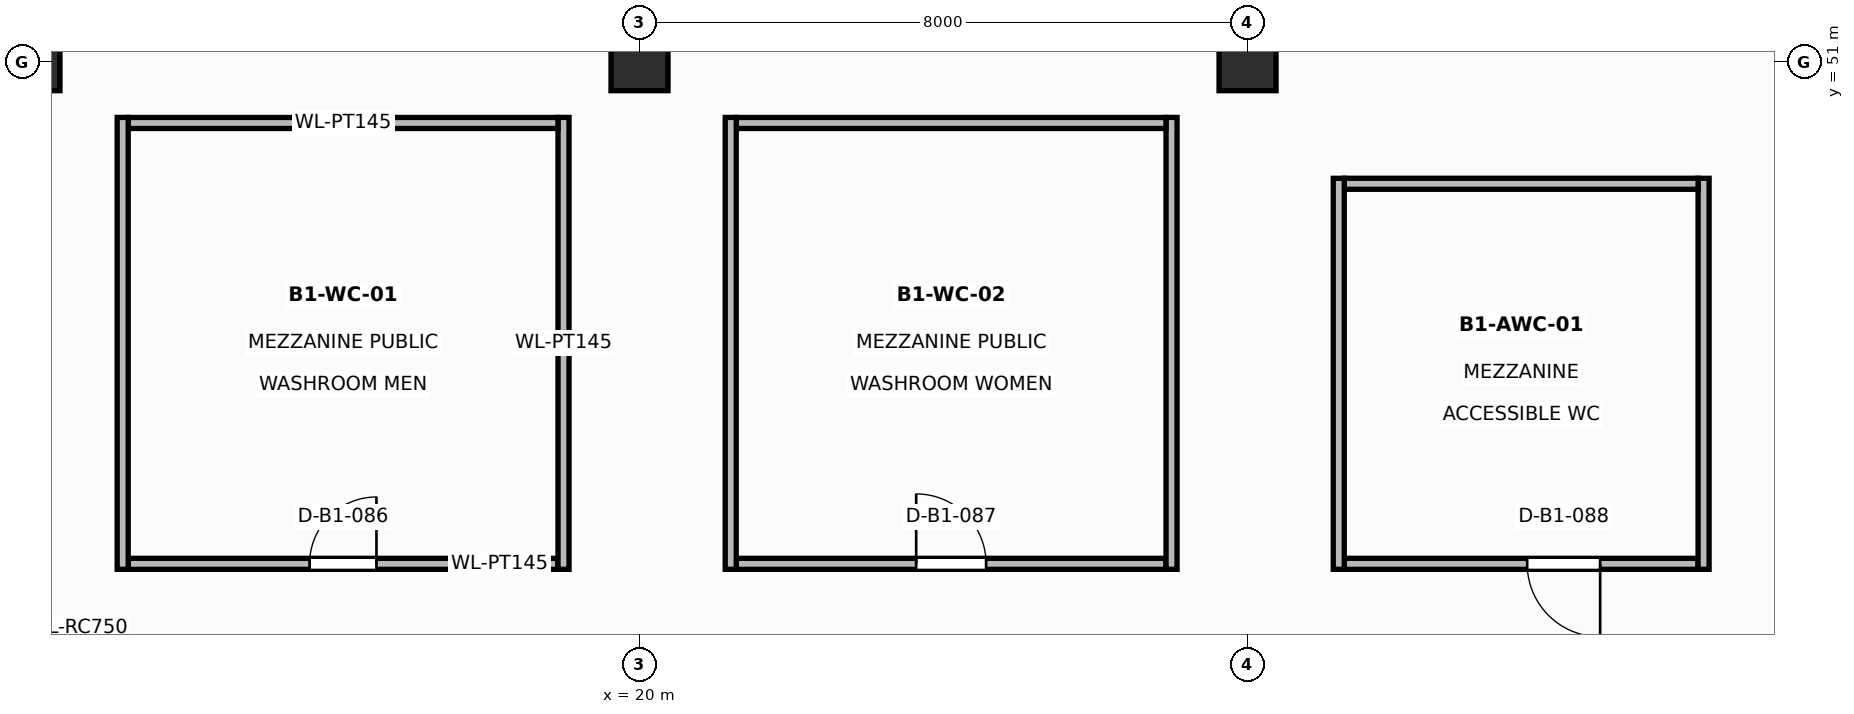
"""IFC4 building model, lengths in metres.
Left out: names, types, materials, properties, quantities, classifications, styles, units other than length and angle.
Written with IfcOpenShell. Run it as: python <this file> out.ifc"""

import sys

from ifc_helpers import new_model, si_unit, direction, frame, frame_2d, origin, origin_2d, place, context, subcontext, project, spatial, rectangle, extrude, element, fill, save


model = new_model("IFC4")
c1 = context("Model", 3, precision=1e-05, world=origin(), true_north=direction((0.0, 1.0)))
c2 = subcontext(c1, "Body", "Model", "MODEL_VIEW")
j1 = project(units=[si_unit("LENGTHUNIT", "METRE"), si_unit("PLANEANGLEUNIT", "RADIAN")], contexts=[c1])
p1 = place(None, origin())
s1 = spatial("IfcSite", under=j1, at=p1, CompositionType="ELEMENT")
p2 = place(p1, origin())
s2 = spatial("IfcBuilding", under=s1, at=p2, CompositionType="ELEMENT")
p3 = place(p2, frame((0.0, 0.0, -5.6)))
s3 = spatial("IfcBuildingStorey", under=s2, at=p3, CompositionType="ELEMENT", Elevation=-5.6)
for number, where, z_axis, x_axis in (
    (1, (12.0, 51.0, 0.0), (0.0, 0.0, 1.0), (1.0, 0.0, 0.0)),
    (2, (20.0, 51.0, 0.0), (0.0, 0.0, 1.0), (1.0, 0.0, 0.0)),
    (3, (28.0, 51.0, 0.0), (0.0, 0.0, 1.0), (1.0, 0.0, 0.0)),
):
    element("IfcColumn", number, at=place(p3, frame(where, z_axis=z_axis, x_axis=x_axis)), inside=s3, PredefinedType="COLUMN", context=c2, shape_type="SweptSolid", body=[
        extrude(rectangle(XDim=0.75, YDim=0.75, at=origin_2d()), origin(), (0.0, 0.0, 1.0), 5.6),
    ])
p4 = place(p3, frame((13.272, 44.4, 0.0), z_axis=(0.0, 0.0, 1.0), x_axis=(1.0, 0.0, 0.0)))
e4 = element("IfcWall", 4, at=p4, inside=s3, PredefinedType="PARTITIONING", context=c2, shape_type="SweptSolid", body=[
    extrude(rectangle(XDim=5.655, YDim=0.145, at=frame_2d((2.828, 0.0))), origin(), (0.0, 0.0, 1.0), 5.18),
])
p5 = place(p4, frame((2.387, 0.0, 0.0)))
e5 = element("IfcOpeningElement", 5, at=p5, cuts=e4, PredefinedType="OPENING", context=c2, shape_type="SweptSolid", body=[
    extrude(rectangle(XDim=0.88, YDim=2.08, at=frame_2d((0.44, 1.04))), frame((0.0, 0.083, 0.0), z_axis=(0.0, -1.0, 0.0), x_axis=(1.0, 0.0, 0.0)), (0.0, 0.0, 1.0), 0.165),
])
p6 = place(p3, frame((19.0, 44.328, 0.0), z_axis=(0.0, 0.0, 1.0), x_axis=(0.0, 1.0, 0.0)))
e6 = element("IfcWall", 6, at=p6, inside=s3, PredefinedType="PARTITIONING", context=c2, shape_type="SweptSolid", body=[
    extrude(rectangle(XDim=5.945, YDim=0.145, at=frame_2d((2.973, 0.0))), origin(), (0.0, 0.0, 1.0), 4.625),
])
p7 = place(p3, frame((18.927, 50.2, 0.0), z_axis=(0.0, 0.0, 1.0), x_axis=(-1.0, 0.0, 0.0)))
e7 = element("IfcWall", 7, at=p7, inside=s3, PredefinedType="PARTITIONING", context=c2, shape_type="SweptSolid", body=[
    extrude(rectangle(XDim=5.655, YDim=0.145, at=frame_2d((2.828, 0.0))), origin(), (0.0, 0.0, 1.0), 5.18),
])
p8 = place(p3, frame((13.2, 50.273, 0.0), z_axis=(0.0, 0.0, 1.0), x_axis=(0.0, -1.0, 0.0)))
e8 = element("IfcWall", 8, at=p8, inside=s3, PredefinedType="PARTITIONING", context=c2, shape_type="SweptSolid", body=[
    extrude(rectangle(XDim=5.945, YDim=0.145, at=frame_2d((2.973, 0.0))), origin(), (0.0, 0.0, 1.0), 4.625),
])
p9 = place(p3, frame((21.273, 44.4, 0.0), z_axis=(0.0, 0.0, 1.0), x_axis=(1.0, 0.0, 0.0)))
e9 = element("IfcWall", 9, at=p9, inside=s3, PredefinedType="PARTITIONING", context=c2, shape_type="SweptSolid", body=[
    extrude(rectangle(XDim=5.654, YDim=0.145, at=frame_2d((2.827, 0.0))), origin(), (0.0, 0.0, 1.0), 5.18),
])
p10 = place(p9, frame((2.367, 0.0, 0.0)))
e10 = element("IfcOpeningElement", 10, at=p10, cuts=e9, PredefinedType="OPENING", context=c2, shape_type="SweptSolid", body=[
    extrude(rectangle(XDim=0.92, YDim=2.1, at=frame_2d((0.46, 1.05))), frame((0.0, 0.083, 0.0), z_axis=(0.0, -1.0, 0.0), x_axis=(1.0, 0.0, 0.0)), (0.0, 0.0, 1.0), 0.165),
])
p11 = place(p3, frame((27.0, 44.328, 0.0), z_axis=(0.0, 0.0, 1.0), x_axis=(0.0, 1.0, 0.0)))
e11 = element("IfcWall", 11, at=p11, inside=s3, PredefinedType="PARTITIONING", context=c2, shape_type="SweptSolid", body=[
    extrude(rectangle(XDim=5.945, YDim=0.145, at=frame_2d((2.973, 0.0))), origin(), (0.0, 0.0, 1.0), 4.625),
])
p12 = place(p3, frame((26.927, 50.2, 0.0), z_axis=(0.0, 0.0, 1.0), x_axis=(-1.0, 0.0, 0.0)))
e12 = element("IfcWall", 12, at=p12, inside=s3, PredefinedType="PARTITIONING", context=c2, shape_type="SweptSolid", body=[
    extrude(rectangle(XDim=5.654, YDim=0.145, at=frame_2d((2.827, 0.0))), origin(), (0.0, 0.0, 1.0), 5.18),
])
p13 = place(p3, frame((21.2, 50.273, 0.0), z_axis=(0.0, 0.0, 1.0), x_axis=(0.0, -1.0, 0.0)))
e13 = element("IfcWall", 13, at=p13, inside=s3, PredefinedType="PARTITIONING", context=c2, shape_type="SweptSolid", body=[
    extrude(rectangle(XDim=5.945, YDim=0.145, at=frame_2d((2.973, 0.0))), origin(), (0.0, 0.0, 1.0), 4.625),
])
p14 = place(p3, frame((29.273, 44.4, 0.0), z_axis=(0.0, 0.0, 1.0), x_axis=(1.0, 0.0, 0.0)))
e14 = element("IfcWall", 14, at=p14, inside=s3, PredefinedType="PARTITIONING", context=c2, shape_type="SweptSolid", body=[
    extrude(rectangle(XDim=4.655, YDim=0.145, at=frame_2d((2.328, 0.0))), origin(), (0.0, 0.0, 1.0), 5.18),
])
p15 = place(p14, frame((2.406, 0.0, 0.0)))
e15 = element("IfcOpeningElement", 15, at=p15, cuts=e14, PredefinedType="OPENING", context=c2, shape_type="SweptSolid", body=[
    extrude(rectangle(XDim=0.96, YDim=2.12, at=frame_2d((0.48, 1.06))), frame((0.0, 0.083, 0.0), z_axis=(0.0, -1.0, 0.0), x_axis=(1.0, 0.0, 0.0)), (0.0, 0.0, 1.0), 0.165),
])
p16 = place(p3, frame((34.0, 44.328, 0.0), z_axis=(0.0, 0.0, 1.0), x_axis=(0.0, 1.0, 0.0)))
e16 = element("IfcWall", 16, at=p16, inside=s3, PredefinedType="PARTITIONING", context=c2, shape_type="SweptSolid", body=[
    extrude(rectangle(XDim=5.144, YDim=0.145, at=frame_2d((2.572, 0.0))), origin(), (0.0, 0.0, 1.0), 4.625),
])
p17 = place(p3, frame((33.928, 49.4, 0.0), z_axis=(0.0, 0.0, 1.0), x_axis=(-1.0, 0.0, 0.0)))
e17 = element("IfcWall", 17, at=p17, inside=s3, PredefinedType="PARTITIONING", context=c2, shape_type="SweptSolid", body=[
    extrude(rectangle(XDim=4.655, YDim=0.145, at=frame_2d((2.328, 0.0))), origin(), (0.0, 0.0, 1.0), 5.18),
])
p18 = place(p3, frame((29.2, 49.472, 0.0), z_axis=(0.0, 0.0, 1.0), x_axis=(0.0, -1.0, 0.0)))
e18 = element("IfcWall", 18, at=p18, inside=s3, PredefinedType="PARTITIONING", context=c2, shape_type="SweptSolid", body=[
    extrude(rectangle(XDim=5.144, YDim=0.145, at=frame_2d((2.572, 0.0))), origin(), (0.0, 0.0, 1.0), 4.625),
])
p19 = place(p5, origin())
e19 = element("IfcDoor", 19, at=p19, inside=s3, OperationType="SINGLE_SWING_RIGHT", PredefinedType="DOOR", context=c2, shape_type="SweptSolid", body=[
    extrude(rectangle(XDim=0.88, YDim=2.08, at=frame_2d((0.44, 1.04))), frame((0.0, 0.025, 0.0), z_axis=(0.0, -1.0, 0.0), x_axis=(1.0, 0.0, 0.0)), (0.0, 0.0, 1.0), 0.05),
])
fill(e5, e19)
p20 = place(p10, origin())
e20 = element("IfcDoor", 20, at=p20, inside=s3, OperationType="SINGLE_SWING_LEFT", PredefinedType="DOOR", context=c2, shape_type="SweptSolid", body=[
    extrude(rectangle(XDim=0.92, YDim=2.1, at=frame_2d((0.46, 1.05))), frame((0.0, 0.025, 0.0), z_axis=(0.0, -1.0, 0.0), x_axis=(1.0, 0.0, 0.0)), (0.0, 0.0, 1.0), 0.05),
])
fill(e10, e20)
p21 = place(p15, frame((0.96, 0.0, 0.0), z_axis=(0.0, 0.0, 1.0), x_axis=(-1.0, 0.0, 0.0)))
e21 = element("IfcDoor", 21, at=p21, inside=s3, OperationType="SINGLE_SWING_RIGHT", PredefinedType="DOOR", context=c2, shape_type="SweptSolid", body=[
    extrude(rectangle(XDim=0.96, YDim=2.12, at=frame_2d((0.48, 1.06))), frame((0.0, 0.025, 0.0), z_axis=(0.0, -1.0, 0.0), x_axis=(1.0, 0.0, 0.0)), (0.0, 0.0, 1.0), 0.05),
])
fill(e15, e21)
save(model, sys.argv[1])
